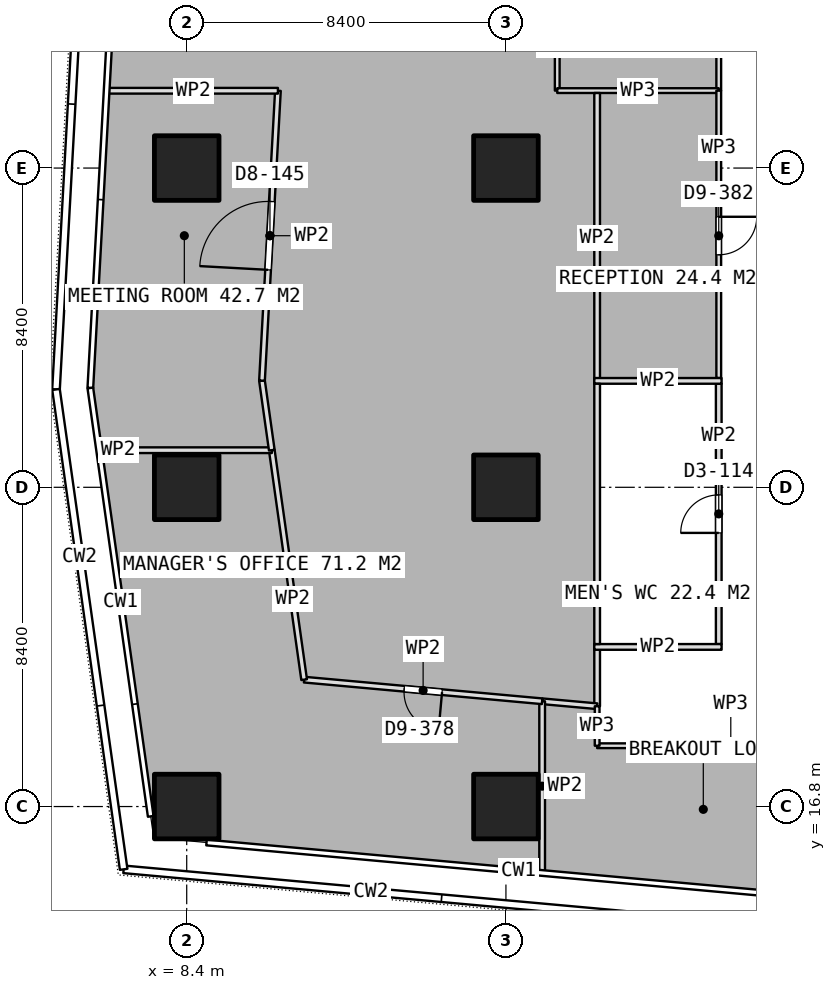
"""IFC4 building model, lengths in metres.
Left out: names, types, materials, properties, quantities, classifications, styles, units other than length and angle.
Written with IfcOpenShell. Run it as: python <this file> out.ifc"""

import sys

from ifc_helpers import new_model, si_unit, direction, frame, frame_2d, origin, origin_2d, place, context, subcontext, project, spatial, rectangle, extrude, element, fill, save


model = new_model("IFC4")
c1 = context("Model", 3, precision=1e-05, world=origin(), true_north=direction((0.0, 1.0)))
c2 = subcontext(c1, "Body", "Model", "MODEL_VIEW")
j1 = project(units=[si_unit("LENGTHUNIT", "METRE"), si_unit("PLANEANGLEUNIT", "RADIAN")], contexts=[c1])
p1 = place(None, origin())
s1 = spatial("IfcSite", under=j1, at=p1, CompositionType="ELEMENT")
p2 = place(p1, origin())
s2 = spatial("IfcBuilding", under=s1, at=p2, CompositionType="ELEMENT")
p3 = place(p2, frame((0.0, 0.0, 110.3)))
s3 = spatial("IfcBuildingStorey", under=s2, at=p3, CompositionType="ELEMENT", Elevation=110.3)
for number, where, z_axis, x_axis in (
    (1, (8.4, 16.8, 0.0), (0.0, 0.0, 1.0), (1.0, 0.0, 0.0)),
    (2, (8.4, 25.2, 0.0), (0.0, 0.0, 1.0), (1.0, 0.0, 0.0)),
    (3, (8.4, 33.6, 0.0), (0.0, 0.0, 1.0), (1.0, 0.0, 0.0)),
    (4, (16.8, 16.8, 0.0), (0.0, 0.0, 1.0), (1.0, 0.0, 0.0)),
    (5, (16.8, 25.2, 0.0), (0.0, 0.0, 1.0), (1.0, 0.0, 0.0)),
    (6, (16.8, 33.6, 0.0), (0.0, 0.0, 1.0), (1.0, 0.0, 0.0)),
):
    element("IfcColumn", number, at=place(p3, frame(where, z_axis=z_axis, x_axis=x_axis)), inside=s3, PredefinedType="COLUMN", context=c2, shape_type="SweptSolid", body=[
        extrude(rectangle(XDim=1.7, YDim=1.7, at=origin_2d()), origin(), (0.0, 0.0, 1.0), 3.75),
    ])
for number, where, z_axis, x_axis in (
    (7, (19.125, 21.0, 0.0), (0.0, 0.0, 1.0), (1.0, 0.0, 0.0)),
    (8, (19.125, 28.0, 0.0), (0.0, 0.0, 1.0), (1.0, 0.0, 0.0)),
):
    element("IfcWall", number, at=place(p3, frame(where, z_axis=z_axis, x_axis=x_axis)), inside=s3, PredefinedType="PARTITIONING", context=c2, shape_type="SweptSolid", body=[
        extrude(rectangle(XDim=3.35, YDim=0.15, at=frame_2d((1.675, 0.0))), origin(), (0.0, 0.0, 1.0), 3.5),
    ])
p4 = place(p3, frame((19.2, 21.075, 0.0), z_axis=(0.0, 0.0, 1.0), x_axis=(0.0, 1.0, 0.0)))
e9 = element("IfcWall", 9, at=p4, inside=s3, PredefinedType="PARTITIONING", context=c2, shape_type="SweptSolid", body=[
    extrude(rectangle(XDim=6.85, YDim=0.15, at=frame_2d((3.425, 0.0))), origin(), (0.0, 0.0, 1.0), 3.5),
])
p5 = place(p3, frame((22.4, 21.075, 0.0), z_axis=(0.0, 0.0, 1.0), x_axis=(0.0, 1.0, 0.0)))
e10 = element("IfcWall", 10, at=p5, inside=s3, PredefinedType="PARTITIONING", context=c2, shape_type="SweptSolid", body=[
    extrude(rectangle(XDim=6.85, YDim=0.15, at=frame_2d((3.425, 0.0))), origin(), (0.0, 0.0, 1.0), 3.5),
])
p6 = place(p5, frame((2.925, 0.0, 0.0)))
e11 = element("IfcOpeningElement", 11, at=p6, cuts=e10, PredefinedType="OPENING", context=c2, shape_type="SweptSolid", body=[
    extrude(rectangle(XDim=1.0, YDim=2.1, at=frame_2d((0.5, 1.05))), frame((0.0, 0.085, 0.0), z_axis=(0.0, -1.0, 0.0), x_axis=(1.0, 0.0, 0.0)), (0.0, 0.0, 1.0), 0.17),
])
p7 = place(p3, frame((18.15, 35.638, 0.0), z_axis=(0.0, 0.0, 1.0), x_axis=(0.0, 1.0, 0.0)))
e12 = element("IfcWall", 12, at=p7, inside=s3, PredefinedType="PARTITIONING", context=c2, shape_type="SweptSolid", body=[
    extrude(rectangle(XDim=5.999, YDim=0.125, at=frame_2d((3.0, 0.0))), origin(), (0.0, 0.0, 1.0), 3.5),
])
p8 = place(p3, frame((22.4, 41.637, 0.0), z_axis=(0.0, 0.0, 1.0), x_axis=(0.0, -1.0, 0.0)))
e13 = element("IfcWall", 13, at=p8, inside=s3, PredefinedType="PARTITIONING", context=c2, shape_type="SweptSolid", body=[
    extrude(rectangle(XDim=5.999, YDim=0.125, at=frame_2d((3.0, 0.0))), origin(), (0.0, 0.0, 1.0), 3.5),
])
p9 = place(p8, frame((2.499, 0.0, 0.0)))
e14 = element("IfcOpeningElement", 14, at=p9, cuts=e13, PredefinedType="OPENING", context=c2, shape_type="SweptSolid", body=[
    extrude(rectangle(XDim=1.0, YDim=2.1, at=frame_2d((0.5, 1.05))), frame((0.0, 0.073, 0.0), z_axis=(0.0, -1.0, 0.0), x_axis=(1.0, 0.0, 0.0)), (0.0, 0.0, 1.0), 0.145),
])
p10 = place(p3, frame((22.4, 35.638, 0.0), z_axis=(0.0, 0.0, 1.0), x_axis=(-1.0, 0.0, 0.0)))
e15 = element("IfcWall", 15, at=p10, inside=s3, PredefinedType="PARTITIONING", context=c2, shape_type="SweptSolid", body=[
    extrude(rectangle(XDim=4.25, YDim=0.125, at=frame_2d((2.125, 0.0))), origin(), (0.0, 0.0, 1.0), 3.5),
])
p11 = place(p3, frame((19.2, 35.575, 0.0), z_axis=(0.0, 0.0, 1.0), x_axis=(0.0, -1.0, 0.0)))
e16 = element("IfcWall", 16, at=p11, inside=s3, PredefinedType="PARTITIONING", context=c2, shape_type="SweptSolid", body=[
    extrude(rectangle(XDim=7.65, YDim=0.15, at=frame_2d((3.825, 0.0))), origin(), (0.0, 0.0, 1.0), 3.5),
])
p12 = place(p3, frame((19.2, 21.075, 0.0), z_axis=(0.0, 0.0, 1.0), x_axis=(0.0, -1.0, 0.0)))
e17 = element("IfcWall", 17, at=p12, inside=s3, PredefinedType="PARTITIONING", context=c2, shape_type="SweptSolid", body=[
    extrude(rectangle(XDim=1.636, YDim=0.15, at=frame_2d((0.818, 0.0))), origin(), (0.0, 0.0, 1.0), 3.5),
])
p13 = place(p3, frame((19.2, 19.439, 0.0), z_axis=(0.0, 0.0, 1.0), x_axis=(-0.995920706464, 0.090232734836, 0.0)))
e18 = element("IfcWall", 18, at=p13, inside=s3, PredefinedType="PARTITIONING", context=c2, shape_type="SweptSolid", body=[
    extrude(rectangle(XDim=1.453, YDim=0.15, at=frame_2d((0.727, 0.0))), origin(), (0.0, 0.0, 1.0), 3.5),
])
p14 = place(p3, frame((17.753, 19.57, 0.0), z_axis=(0.0, 0.0, 1.0), x_axis=(0.0, -1.0, 0.0)))
e19 = element("IfcWall", 19, at=p14, inside=s3, PredefinedType="PARTITIONING", context=c2, shape_type="SweptSolid", body=[
    extrude(rectangle(XDim=4.468, YDim=0.15, at=frame_2d((2.234, 0.0))), origin(), (0.0, 0.0, 1.0), 3.5),
])
p15 = place(p3, frame((17.752, 19.57, 0.0), z_axis=(0.0, 0.0, 1.0), x_axis=(-0.995899251229, 0.090469229029, 0.0)))
e20 = element("IfcWall", 20, at=p15, inside=s3, PredefinedType="PARTITIONING", context=c2, shape_type="SweptSolid", body=[
    extrude(rectangle(XDim=6.288, YDim=0.15, at=frame_2d((3.144, 0.0))), origin(), (0.0, 0.0, 1.0), 3.5),
])
p16 = place(p15, frame((2.644, 0.0, 0.0)))
e21 = element("IfcOpeningElement", 21, at=p16, cuts=e20, PredefinedType="OPENING", context=c2, shape_type="SweptSolid", body=[
    extrude(rectangle(XDim=1.0, YDim=2.1, at=frame_2d((0.5, 1.05))), frame((0.0, 0.085, 0.0), z_axis=(0.0, -1.0, 0.0), x_axis=(1.0, 0.0, 0.0)), (0.0, 0.0, 1.0), 0.17),
])
p17 = place(p3, frame((11.49, 20.139, 0.0), z_axis=(0.0, 0.0, 1.0), x_axis=(-0.139593505482, 0.990208893733, 0.0)))
e22 = element("IfcWall", 22, at=p17, inside=s3, PredefinedType="PARTITIONING", context=c2, shape_type="SweptSolid", body=[
    extrude(rectangle(XDim=6.097, YDim=0.15, at=frame_2d((3.048, 0.0))), origin(), (0.0, 0.0, 1.0), 3.5),
])
p18 = place(p3, frame((10.639, 26.176, 0.0), z_axis=(0.0, 0.0, 1.0), x_axis=(-1.0, 0.0, 0.0)))
e23 = element("IfcWall", 23, at=p18, inside=s3, PredefinedType="PARTITIONING", context=c2, shape_type="SweptSolid", body=[
    extrude(rectangle(XDim=4.494, YDim=0.15, at=frame_2d((2.247, 0.0))), origin(), (0.0, 0.0, 1.0), 3.5),
])
p19 = place(p3, frame((10.639, 26.177, 0.0), z_axis=(0.0, 0.0, 1.0), x_axis=(-0.139570739539, 0.990212102867, 0.0)))
e24 = element("IfcWall", 24, at=p19, inside=s3, PredefinedType="PARTITIONING", context=c2, shape_type="SweptSolid", body=[
    extrude(rectangle(XDim=1.847, YDim=0.15, at=frame_2d((0.924, 0.0))), origin(), (0.0, 0.0, 1.0), 3.5),
])
p20 = place(p3, frame((10.381, 28.006, 0.0), z_axis=(0.0, 0.0, 1.0), x_axis=(0.054839895522, 0.998495160659, 0.0)))
e25 = element("IfcWall", 25, at=p20, inside=s3, PredefinedType="PARTITIONING", context=c2, shape_type="SweptSolid", body=[
    extrude(rectangle(XDim=7.639, YDim=0.15, at=frame_2d((3.82, 0.0))), origin(), (0.0, 0.0, 1.0), 3.5),
])
p21 = place(p20, frame((2.92, 0.0, 0.0)))
e26 = element("IfcOpeningElement", 26, at=p21, cuts=e25, PredefinedType="OPENING", context=c2, shape_type="SweptSolid", body=[
    extrude(rectangle(XDim=1.8, YDim=2.1, at=frame_2d((0.9, 1.05))), frame((0.0, 0.085, 0.0), z_axis=(0.0, -1.0, 0.0), x_axis=(1.0, 0.0, 0.0)), (0.0, 0.0, 1.0), 0.17),
])
p22 = place(p3, frame((10.8, 35.634, 0.0), z_axis=(0.0, 0.0, 1.0), x_axis=(-1.0, 0.0, 0.0)))
e27 = element("IfcWall", 27, at=p22, inside=s3, PredefinedType="PARTITIONING", context=c2, shape_type="SweptSolid", body=[
    extrude(rectangle(XDim=4.457, YDim=0.15, at=frame_2d((2.229, 0.0))), origin(), (0.0, 0.0, 1.0), 3.5),
])
p23 = place(p3, frame((19.2, 18.4, 0.0), z_axis=(0.0, 0.0, 1.0), x_axis=(1.0, 0.0, 0.0)))
e28 = element("IfcWall", 28, at=p23, inside=s3, PredefinedType="PARTITIONING", context=c2, shape_type="SweptSolid", body=[
    extrude(rectangle(XDim=7.034, YDim=0.125, at=frame_2d((3.517, 0.0))), origin(), (0.0, 0.0, 1.0), 3.5),
])
p24 = place(p3, frame((19.2, 19.439, 0.0), z_axis=(0.0, 0.0, 1.0), x_axis=(0.0, -1.0, 0.0)))
e29 = element("IfcWall", 29, at=p24, inside=s3, PredefinedType="PARTITIONING", context=c2, shape_type="SweptSolid", body=[
    extrude(rectangle(XDim=1.039, YDim=0.125, at=frame_2d((0.52, 0.0))), origin(), (0.0, 0.0, 1.0), 3.5),
])
p25 = place(p3, frame((22.4, 35.637, 0.0), z_axis=(0.0, 0.0, 1.0), x_axis=(0.0, -1.0, 0.0)))
e30 = element("IfcWall", 30, at=p25, inside=s3, PredefinedType="PARTITIONING", context=c2, shape_type="SweptSolid", body=[
    extrude(rectangle(XDim=7.562, YDim=0.125, at=frame_2d((3.781, 0.0))), origin(), (0.0, 0.0, 1.0), 3.5),
])
p26 = place(p25, frame((3.319, 0.0, 0.0)))
e31 = element("IfcOpeningElement", 31, at=p26, cuts=e30, PredefinedType="OPENING", context=c2, shape_type="SweptSolid", body=[
    extrude(rectangle(XDim=1.0, YDim=2.1, at=frame_2d((0.5, 1.05))), frame((0.0, 0.073, 0.0), z_axis=(0.0, -1.0, 0.0), x_axis=(1.0, 0.0, 0.0)), (0.0, 0.0, 1.0), 0.145),
])
p27 = place(p6, origin())
e32 = element("IfcDoor", 32, at=p27, inside=s3, OperationType="SINGLE_SWING_LEFT", PredefinedType="DOOR", context=c2, shape_type="SweptSolid", body=[
    extrude(rectangle(XDim=1.0, YDim=2.1, at=frame_2d((0.5, 1.05))), frame((0.0, 0.025, 0.0), z_axis=(0.0, -1.0, 0.0), x_axis=(1.0, 0.0, 0.0)), (0.0, 0.0, 1.0), 0.05),
])
fill(e11, e32)
p28 = place(p21, origin())
e33 = element("IfcDoor", 33, at=p28, inside=s3, OperationType="DOUBLE_DOOR_SINGLE_SWING", PredefinedType="DOOR", context=c2, shape_type="SweptSolid", body=[
    extrude(rectangle(XDim=1.8, YDim=2.1, at=frame_2d((0.9, 1.05))), frame((0.0, 0.025, 0.0), z_axis=(0.0, -1.0, 0.0), x_axis=(1.0, 0.0, 0.0)), (0.0, 0.0, 1.0), 0.05),
])
fill(e26, e33)
p29 = place(p16, origin())
e34 = element("IfcDoor", 34, at=p29, inside=s3, OperationType="SINGLE_SWING_LEFT", PredefinedType="DOOR", context=c2, shape_type="SweptSolid", body=[
    extrude(rectangle(XDim=1.0, YDim=2.1, at=frame_2d((0.5, 1.05))), frame((0.0, 0.025, 0.0), z_axis=(0.0, -1.0, 0.0), x_axis=(1.0, 0.0, 0.0)), (0.0, 0.0, 1.0), 0.05),
])
fill(e21, e34)
p30 = place(p26, origin())
e35 = element("IfcDoor", 35, at=p30, inside=s3, OperationType="SINGLE_SWING_LEFT", PredefinedType="DOOR", context=c2, shape_type="SweptSolid", body=[
    extrude(rectangle(XDim=1.0, YDim=2.1, at=frame_2d((0.5, 1.05))), frame((0.0, 0.025, 0.0), z_axis=(0.0, -1.0, 0.0), x_axis=(1.0, 0.0, 0.0)), (0.0, 0.0, 1.0), 0.05),
])
fill(e31, e35)
save(model, sys.argv[1])
